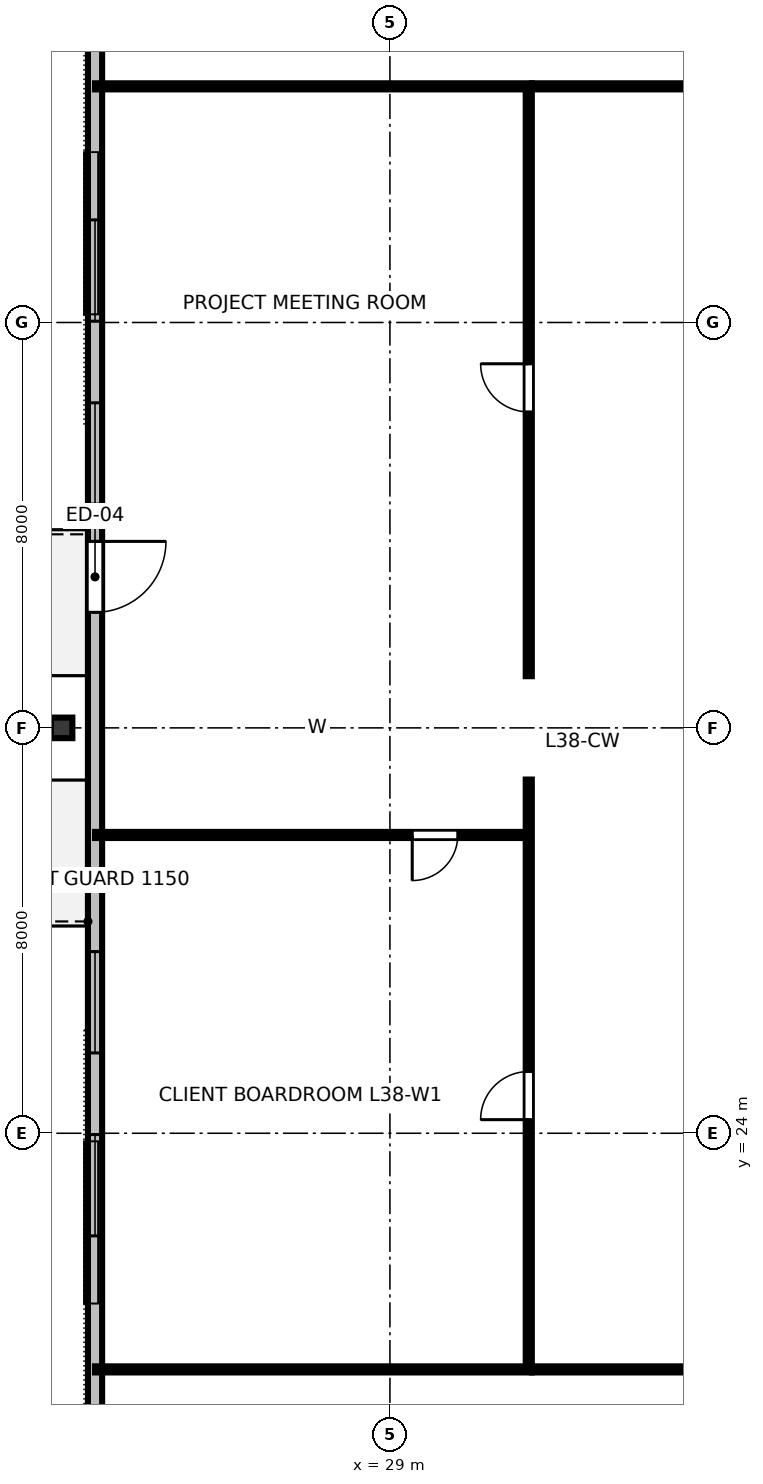
"""IFC4 building model, lengths in metres.
Left out: names, types, materials, properties, quantities, classifications, styles, units other than length and angle.
Written with IfcOpenShell. Run it as: python <this file> out.ifc"""

import sys

from ifc_helpers import new_model, si_unit, direction, frame, frame_2d, origin, origin_2d, place, context, subcontext, project, spatial, rectangle, i_section, extrude, element, fill, save


model = new_model("IFC4")
c1 = context("Model", 3, precision=1e-05, world=origin(), true_north=direction((0.0, 1.0)))
c2 = subcontext(c1, "Body", "Model", "MODEL_VIEW")
j1 = project(units=[si_unit("LENGTHUNIT", "METRE"), si_unit("PLANEANGLEUNIT", "RADIAN")], contexts=[c1])
p1 = place(None, origin())
s1 = spatial("IfcSite", under=j1, at=p1, CompositionType="ELEMENT")
p2 = place(p1, origin())
s2 = spatial("IfcBuilding", under=s1, at=p2, CompositionType="ELEMENT")
p3 = place(p2, frame((0.0, 0.0, 145.6)))
s3 = spatial("IfcBuildingStorey", under=s2, at=p3, CompositionType="ELEMENT", Elevation=145.6)
p4 = place(p3, frame((22.52, 32.0, 0.0), z_axis=(-0.089001216718, 0.0, 0.996031517284), x_axis=(0.996031517284, 0.0, 0.089001216718)))
e1 = element("IfcColumn", 1, at=p4, inside=s3, PredefinedType="COLUMN", context=c2, shape_type="SweptSolid", body=[
    extrude(i_section(OverallWidth=0.406, OverallDepth=0.425, WebThickness=0.033, FlangeThickness=0.052, FilletRadius=0.025, at=origin_2d()), origin(), (0.0, 0.0, 1.0), 3.371),
])
p5 = place(p3, frame((23.18, 47.54, 0.0), z_axis=(0.0, 0.0, 1.0), x_axis=(0.0, -1.0, 0.0)))
e2 = element("IfcWall", 2, at=p5, inside=s3, PredefinedType="STANDARD", context=c2, shape_type="SweptSolid", body=[
    extrude(rectangle(XDim=31.08, YDim=0.28, at=frame_2d((15.54, 0.0))), origin(), (0.0, 0.0, 1.0), 3.36),
])
p6 = place(p5, frame((11.86, 0.0, 0.0)))
e3 = element("IfcOpeningElement", 3, at=p6, cuts=e2, PredefinedType="OPENING", context=c2, shape_type="SweptSolid", body=[
    extrude(rectangle(XDim=1.4, YDim=2.15, at=frame_2d((0.7, 1.075))), frame((0.0, 0.15, 0.0), z_axis=(0.0, -1.0, 0.0), x_axis=(1.0, 0.0, 0.0)), (0.0, 0.0, 1.0), 0.3),
])
p7 = place(p5, frame((5.515, 0.0, 0.8)))
e4 = element("IfcOpeningElement", 4, at=p7, cuts=e2, PredefinedType="OPENING", context=c2, shape_type="SweptSolid", body=[
    extrude(rectangle(XDim=2.0, YDim=1.95, at=frame_2d((1.0, 0.975))), frame((0.0, 0.15, 0.0), z_axis=(0.0, -1.0, 0.0), x_axis=(1.0, 0.0, 0.0)), (0.0, 0.0, 1.0), 0.3),
])
p8 = place(p5, frame((9.125, 0.0, 0.8)))
e5 = element("IfcOpeningElement", 5, at=p8, cuts=e2, PredefinedType="OPENING", context=c2, shape_type="SweptSolid", body=[
    extrude(rectangle(XDim=2.0, YDim=1.95, at=frame_2d((1.0, 0.975))), frame((0.0, 0.15, 0.0), z_axis=(0.0, -1.0, 0.0), x_axis=(1.0, 0.0, 0.0)), (0.0, 0.0, 1.0), 0.3),
])
p9 = place(p5, frame((19.955, 0.0, 0.8)))
e6 = element("IfcOpeningElement", 6, at=p9, cuts=e2, PredefinedType="OPENING", context=c2, shape_type="SweptSolid", body=[
    extrude(rectangle(XDim=2.0, YDim=1.95, at=frame_2d((1.0, 0.975))), frame((0.0, 0.15, 0.0), z_axis=(0.0, -1.0, 0.0), x_axis=(1.0, 0.0, 0.0)), (0.0, 0.0, 1.0), 0.3),
])
p10 = place(p5, frame((23.565, 0.0, 0.8)))
e7 = element("IfcOpeningElement", 7, at=p10, cuts=e2, PredefinedType="OPENING", context=c2, shape_type="SweptSolid", body=[
    extrude(rectangle(XDim=2.0, YDim=1.95, at=frame_2d((1.0, 0.975))), frame((0.0, 0.15, 0.0), z_axis=(0.0, -1.0, 0.0), x_axis=(1.0, 0.0, 0.0)), (0.0, 0.0, 1.0), 0.3),
])
p11 = place(p3, frame((31.8, 19.34, 0.0), z_axis=(0.0, 0.0, 1.0), x_axis=(1.0, 0.0, 0.0)))
e8 = element("IfcWall", 8, at=p11, inside=s3, PredefinedType="PARTITIONING", context=c2, shape_type="SweptSolid", body=[
    extrude(rectangle(XDim=28.4, YDim=0.12, at=frame_2d((14.2, 0.0))), origin(), (0.0, 0.0, 1.0), 2.64),
])
p12 = place(p11, frame((3.771, 0.0, 0.0)))
e9 = element("IfcOpeningElement", 9, at=p12, cuts=e8, PredefinedType="OPENING", context=c2, shape_type="SweptSolid", body=[
    extrude(rectangle(XDim=0.95, YDim=2.15, at=frame_2d((0.475, 1.075))), frame((0.0, 0.07, 0.0), z_axis=(0.0, -1.0, 0.0), x_axis=(1.0, 0.0, 0.0)), (0.0, 0.0, 1.0), 0.14),
])
p13 = place(p11, frame((10.068, 0.0, 0.0)))
e10 = element("IfcOpeningElement", 10, at=p13, cuts=e8, PredefinedType="OPENING", context=c2, shape_type="SweptSolid", body=[
    extrude(rectangle(XDim=0.95, YDim=2.15, at=frame_2d((0.475, 1.075))), frame((0.0, 0.07, 0.0), z_axis=(0.0, -1.0, 0.0), x_axis=(1.0, 0.0, 0.0)), (0.0, 0.0, 1.0), 0.14),
])
p14 = place(p11, frame((13.828, 0.0, 0.0)))
e11 = element("IfcOpeningElement", 11, at=p14, cuts=e8, PredefinedType="OPENING", context=c2, shape_type="SweptSolid", body=[
    extrude(rectangle(XDim=0.95, YDim=2.15, at=frame_2d((0.475, 1.075))), frame((0.0, 0.07, 0.0), z_axis=(0.0, -1.0, 0.0), x_axis=(1.0, 0.0, 0.0)), (0.0, 0.0, 1.0), 0.14),
])
p15 = place(p11, frame((18.648, 0.0, 0.0)))
e12 = element("IfcOpeningElement", 12, at=p15, cuts=e8, PredefinedType="OPENING", context=c2, shape_type="SweptSolid", body=[
    extrude(rectangle(XDim=0.95, YDim=2.15, at=frame_2d((0.475, 1.075))), frame((0.0, 0.07, 0.0), z_axis=(0.0, -1.0, 0.0), x_axis=(1.0, 0.0, 0.0)), (0.0, 0.0, 1.0), 0.14),
])
p16 = place(p11, frame((24.842, 0.0, 0.0)))
e13 = element("IfcOpeningElement", 13, at=p16, cuts=e8, PredefinedType="OPENING", context=c2, shape_type="SweptSolid", body=[
    extrude(rectangle(XDim=0.95, YDim=2.15, at=frame_2d((0.475, 1.075))), frame((0.0, 0.07, 0.0), z_axis=(0.0, -1.0, 0.0), x_axis=(1.0, 0.0, 0.0)), (0.0, 0.0, 1.0), 0.14),
])
p17 = place(p3, frame((31.8, 44.66, 0.0), z_axis=(0.0, 0.0, 1.0), x_axis=(1.0, 0.0, 0.0)))
e14 = element("IfcWall", 14, at=p17, inside=s3, PredefinedType="PARTITIONING", context=c2, shape_type="SweptSolid", body=[
    extrude(rectangle(XDim=28.4, YDim=0.12, at=frame_2d((14.2, 0.0))), origin(), (0.0, 0.0, 1.0), 2.64),
])
p18 = place(p17, frame((3.705, 0.0, 0.0)))
e15 = element("IfcOpeningElement", 15, at=p18, cuts=e14, PredefinedType="OPENING", context=c2, shape_type="SweptSolid", body=[
    extrude(rectangle(XDim=0.95, YDim=2.15, at=frame_2d((0.475, 1.075))), frame((0.0, 0.07, 0.0), z_axis=(0.0, -1.0, 0.0), x_axis=(1.0, 0.0, 0.0)), (0.0, 0.0, 1.0), 0.14),
])
p19 = place(p17, frame((11.836, 0.0, 0.0)))
e16 = element("IfcOpeningElement", 16, at=p19, cuts=e14, PredefinedType="OPENING", context=c2, shape_type="SweptSolid", body=[
    extrude(rectangle(XDim=0.95, YDim=2.15, at=frame_2d((0.475, 1.075))), frame((0.0, 0.07, 0.0), z_axis=(0.0, -1.0, 0.0), x_axis=(1.0, 0.0, 0.0)), (0.0, 0.0, 1.0), 0.14),
])
p20 = place(p17, frame((21.856, 0.0, 0.0)))
e17 = element("IfcOpeningElement", 17, at=p20, cuts=e14, PredefinedType="OPENING", context=c2, shape_type="SweptSolid", body=[
    extrude(rectangle(XDim=0.95, YDim=2.15, at=frame_2d((0.475, 1.075))), frame((0.0, 0.07, 0.0), z_axis=(0.0, -1.0, 0.0), x_axis=(1.0, 0.0, 0.0)), (0.0, 0.0, 1.0), 0.14),
])
p21 = place(p3, frame((31.74, 29.887, 0.0), z_axis=(0.0, 0.0, 1.0), x_axis=(-1.0, 0.0, 0.0)))
e18 = element("IfcWall", 18, at=p21, inside=s3, PredefinedType="PARTITIONING", context=c2, shape_type="SweptSolid", body=[
    extrude(rectangle(XDim=8.56, YDim=0.12, at=frame_2d((4.28, 0.0))), origin(), (0.0, 0.0, 1.0), 2.64),
])
p22 = place(p21, frame((1.4, 0.0, 0.0)))
e19 = element("IfcOpeningElement", 19, at=p22, cuts=e18, PredefinedType="OPENING", context=c2, shape_type="SweptSolid", body=[
    extrude(rectangle(XDim=0.9, YDim=2.15, at=frame_2d((0.45, 1.075))), frame((0.0, 0.07, 0.0), z_axis=(0.0, -1.0, 0.0), x_axis=(1.0, 0.0, 0.0)), (0.0, 0.0, 1.0), 0.14),
])
p23 = place(p3, frame((31.74, 19.4, 0.0), z_axis=(0.0, 0.0, 1.0), x_axis=(0.0, 1.0, 0.0)))
e20 = element("IfcWall", 20, at=p23, inside=s3, PredefinedType="PARTITIONING", context=c2, shape_type="SweptSolid", body=[
    extrude(rectangle(XDim=11.58, YDim=0.12, at=frame_2d((5.79, 0.0))), origin(), (0.0, 0.0, 1.0), 2.64),
])
p24 = place(p23, frame((4.868, 0.0, 0.0)))
e21 = element("IfcOpeningElement", 21, at=p24, cuts=e20, PredefinedType="OPENING", context=c2, shape_type="SweptSolid", body=[
    extrude(rectangle(XDim=0.95, YDim=2.15, at=frame_2d((0.475, 1.075))), frame((0.0, 0.07, 0.0), z_axis=(0.0, -1.0, 0.0), x_axis=(1.0, 0.0, 0.0)), (0.0, 0.0, 1.0), 0.14),
])
p25 = place(p3, frame((31.74, 33.02, 0.0), z_axis=(0.0, 0.0, 1.0), x_axis=(0.0, 1.0, 0.0)))
e22 = element("IfcWall", 22, at=p25, inside=s3, PredefinedType="PARTITIONING", context=c2, shape_type="SweptSolid", body=[
    extrude(rectangle(XDim=11.58, YDim=0.12, at=frame_2d((5.79, 0.0))), origin(), (0.0, 0.0, 1.0), 2.64),
])
p26 = place(p25, frame((5.215, 0.0, 0.0)))
e23 = element("IfcOpeningElement", 23, at=p26, cuts=e22, PredefinedType="OPENING", context=c2, shape_type="SweptSolid", body=[
    extrude(rectangle(XDim=0.95, YDim=2.15, at=frame_2d((0.475, 1.075))), frame((0.0, 0.07, 0.0), z_axis=(0.0, -1.0, 0.0), x_axis=(1.0, 0.0, 0.0)), (0.0, 0.0, 1.0), 0.14),
])
for number, where, z_axis, x_axis in (
    (24, (31.8, 19.34, 0.0), (0.0, 0.0, 1.0), (-1.0, 0.0, 0.0)),
    (25, (31.8, 44.66, 0.0), (0.0, 0.0, 1.0), (-1.0, 0.0, 0.0)),
):
    element("IfcWall", number, at=place(p3, frame(where, z_axis=z_axis, x_axis=x_axis)), inside=s3, PredefinedType="PARTITIONING", context=c2, shape_type="SweptSolid", body=[
        extrude(rectangle(XDim=8.62, YDim=0.12, at=frame_2d((4.31, 0.0))), origin(), (0.0, 0.0, 1.0), 2.64),
    ])
p27 = place(p6, origin())
e26 = element("IfcDoor", 26, at=p27, inside=s3, OperationType="SINGLE_SWING_LEFT", PredefinedType="DOOR", context=c2, shape_type="SweptSolid", body=[
    extrude(rectangle(XDim=1.4, YDim=2.15, at=frame_2d((0.7, 1.075))), frame((0.0, 0.025, 0.0), z_axis=(0.0, -1.0, 0.0), x_axis=(1.0, 0.0, 0.0)), (0.0, 0.0, 1.0), 0.05),
])
fill(e3, e26)
p28 = place(p7, origin())
e27 = element("IfcWindow", 27, at=p28, inside=s3, PartitioningType="SINGLE_PANEL", PredefinedType="WINDOW", context=c2, shape_type="SweptSolid", body=[
    extrude(rectangle(XDim=2.0, YDim=1.95, at=frame_2d((1.0, 0.975))), frame((0.0, 0.03, 0.0), z_axis=(0.0, -1.0, 0.0), x_axis=(1.0, 0.0, 0.0)), (0.0, 0.0, 1.0), 0.06),
])
fill(e4, e27)
p29 = place(p8, origin())
e28 = element("IfcWindow", 28, at=p29, inside=s3, PartitioningType="SINGLE_PANEL", PredefinedType="WINDOW", context=c2, shape_type="SweptSolid", body=[
    extrude(rectangle(XDim=2.0, YDim=1.95, at=frame_2d((1.0, 0.975))), frame((0.0, 0.03, 0.0), z_axis=(0.0, -1.0, 0.0), x_axis=(1.0, 0.0, 0.0)), (0.0, 0.0, 1.0), 0.06),
])
fill(e5, e28)
p30 = place(p9, origin())
e29 = element("IfcWindow", 29, at=p30, inside=s3, PartitioningType="SINGLE_PANEL", PredefinedType="WINDOW", context=c2, shape_type="SweptSolid", body=[
    extrude(rectangle(XDim=2.0, YDim=1.95, at=frame_2d((1.0, 0.975))), frame((0.0, 0.03, 0.0), z_axis=(0.0, -1.0, 0.0), x_axis=(1.0, 0.0, 0.0)), (0.0, 0.0, 1.0), 0.06),
])
fill(e6, e29)
p31 = place(p10, origin())
e30 = element("IfcWindow", 30, at=p31, inside=s3, PartitioningType="SINGLE_PANEL", PredefinedType="WINDOW", context=c2, shape_type="SweptSolid", body=[
    extrude(rectangle(XDim=2.0, YDim=1.95, at=frame_2d((1.0, 0.975))), frame((0.0, 0.03, 0.0), z_axis=(0.0, -1.0, 0.0), x_axis=(1.0, 0.0, 0.0)), (0.0, 0.0, 1.0), 0.06),
])
fill(e7, e30)
p32 = place(p22, origin())
e31 = element("IfcDoor", 31, at=p32, inside=s3, OperationType="SINGLE_SWING_RIGHT", PredefinedType="DOOR", context=c2, shape_type="SweptSolid", body=[
    extrude(rectangle(XDim=0.9, YDim=2.15, at=frame_2d((0.45, 1.075))), frame((0.0, 0.025, 0.0), z_axis=(0.0, -1.0, 0.0), x_axis=(1.0, 0.0, 0.0)), (0.0, 0.0, 1.0), 0.05),
])
fill(e19, e31)
p33 = place(p24, origin())
e32 = element("IfcDoor", 32, at=p33, inside=s3, OperationType="SINGLE_SWING_LEFT", PredefinedType="DOOR", context=c2, shape_type="SweptSolid", body=[
    extrude(rectangle(XDim=0.95, YDim=2.15, at=frame_2d((0.475, 1.075))), frame((0.0, 0.025, 0.0), z_axis=(0.0, -1.0, 0.0), x_axis=(1.0, 0.0, 0.0)), (0.0, 0.0, 1.0), 0.05),
])
fill(e21, e32)
p34 = place(p26, origin())
e33 = element("IfcDoor", 33, at=p34, inside=s3, OperationType="SINGLE_SWING_RIGHT", PredefinedType="DOOR", context=c2, shape_type="SweptSolid", body=[
    extrude(rectangle(XDim=0.95, YDim=2.15, at=frame_2d((0.475, 1.075))), frame((0.0, 0.025, 0.0), z_axis=(0.0, -1.0, 0.0), x_axis=(1.0, 0.0, 0.0)), (0.0, 0.0, 1.0), 0.05),
])
fill(e23, e33)
save(model, sys.argv[1])
